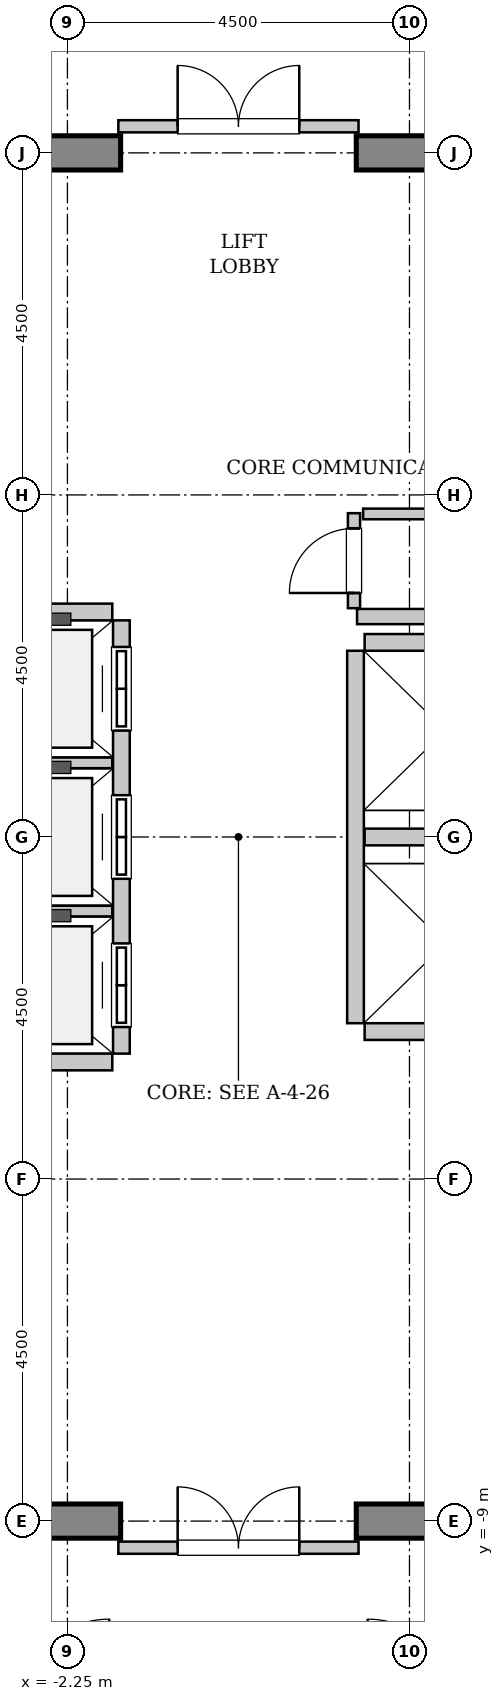
"""IFC4 building model, lengths in metres.
Left out: names, types, materials, properties, quantities, classifications, styles, units other than length and angle.
Written with IfcOpenShell. Run it as: python <this file> out.ifc"""

import sys

from ifc_helpers import new_model, si_unit, direction, frame, frame_2d, origin, place, context, subcontext, project, spatial, rectangle, extrude, source, transform, mapped, element, fill, save


model = new_model("IFC4")
c1 = context("Model", 3, precision=1e-05, world=origin(), true_north=direction((0.0, 1.0)))
c2 = subcontext(c1, "Body", "Model", "MODEL_VIEW")
j1 = project(units=[si_unit("LENGTHUNIT", "METRE"), si_unit("PLANEANGLEUNIT", "RADIAN")], contexts=[c1])
p1 = place(None, origin())
s1 = spatial("IfcSite", under=j1, at=p1, CompositionType="ELEMENT")
p2 = place(p1, origin())
s2 = spatial("IfcBuilding", under=s1, at=p2, CompositionType="ELEMENT")
p3 = place(p2, frame((0.0, 0.0, 317.8)))
s3 = spatial("IfcBuildingStorey", under=s2, at=p3, CompositionType="ELEMENT", Elevation=317.8)
m1 = source(origin(), c2, "Body", "SweptSolid", [
    extrude(rectangle(XDim=9.925, YDim=0.45, at=frame_2d((4.962, 0.0))), origin(), (0.0, 0.0, 1.0), 4.6),
])
for number, where, z_axis, x_axis in (
    (1, (-11.475, 9.0, 0.0), (0.0, 0.0, 1.0), (1.0, 0.0, 0.0)),
    (2, (1.55, 9.0, 0.0), (0.0, 0.0, 1.0), (1.0, 0.0, 0.0)),
    (3, (-11.475, -9.0, 0.0), (0.0, 0.0, 1.0), (1.0, 0.0, 0.0)),
    (4, (1.55, -9.0, 0.0), (0.0, 0.0, 1.0), (1.0, 0.0, 0.0)),
):
    element("IfcWall", number, at=place(p3, frame(where, z_axis=z_axis, x_axis=x_axis)), inside=s3, PredefinedType="SHEAR", context=c2, shape_type="MappedRepresentation", body=[
        mapped(m1, transform((0.0, 0.0, 0.0), x_axis=(1.0, 0.0, 0.0), y_axis=(0.0, 1.0, 0.0), z_axis=(0.0, 0.0, 1.0), scale=1.0)),
    ])
m2 = source(origin(), c2, "Body", "SweptSolid", [
    extrude(rectangle(XDim=5.7, YDim=0.22, at=frame_2d((2.85, 0.0))), origin(), (0.0, 0.0, 1.0), 4.335),
])
p4 = place(p3, frame((-1.54, -2.85, 0.0), z_axis=(0.0, 0.0, 1.0), x_axis=(0.0, 1.0, 0.0)))
e5 = element("IfcWall", 5, at=p4, inside=s3, PredefinedType="SOLIDWALL", context=c2, shape_type="MappedRepresentation", body=[
    mapped(m2, transform((0.0, 0.0, 0.0), x_axis=(1.0, 0.0, 0.0), y_axis=(0.0, 1.0, 0.0), z_axis=(0.0, 0.0, 1.0), scale=1.0)),
])
p5 = place(p4, frame((0.35, 0.0, 0.0)))
e6 = element("IfcOpeningElement", 6, at=p5, cuts=e5, PredefinedType="OPENING", context=c2, shape_type="SweptSolid", body=[
    extrude(rectangle(XDim=1.1, YDim=2.2, at=frame_2d((0.55, 1.1))), frame((0.0, 0.12, 0.0), z_axis=(0.0, -1.0, 0.0), x_axis=(1.0, 0.0, 0.0)), (0.0, 0.0, 1.0), 0.24),
])
p6 = place(p4, frame((2.3, 0.0, 0.0)))
e7 = element("IfcOpeningElement", 7, at=p6, cuts=e5, PredefinedType="OPENING", context=c2, shape_type="SweptSolid", body=[
    extrude(rectangle(XDim=1.1, YDim=2.2, at=frame_2d((0.55, 1.1))), frame((0.0, 0.12, 0.0), z_axis=(0.0, -1.0, 0.0), x_axis=(1.0, 0.0, 0.0)), (0.0, 0.0, 1.0), 0.24),
])
p7 = place(p4, frame((4.25, 0.0, 0.0)))
e8 = element("IfcOpeningElement", 8, at=p7, cuts=e5, PredefinedType="OPENING", context=c2, shape_type="SweptSolid", body=[
    extrude(rectangle(XDim=1.1, YDim=2.2, at=frame_2d((0.55, 1.1))), frame((0.0, 0.12, 0.0), z_axis=(0.0, -1.0, 0.0), x_axis=(1.0, 0.0, 0.0)), (0.0, 0.0, 1.0), 0.24),
])
m3 = source(origin(), c2, "Body", "SweptSolid", [
    extrude(rectangle(XDim=2.13, YDim=0.22, at=frame_2d((1.065, 0.0))), origin(), (0.0, 0.0, 1.0), 4.335),
])
p8 = place(p3, frame((-3.79, -2.96, 0.0), z_axis=(0.0, 0.0, 1.0), x_axis=(1.0, 0.0, 0.0)))
e9 = element("IfcWall", 9, at=p8, inside=s3, PredefinedType="SOLIDWALL", context=c2, shape_type="MappedRepresentation", body=[
    mapped(m3, transform((0.0, 0.0, 0.0), x_axis=(1.0, 0.0, 0.0), y_axis=(0.0, 1.0, 0.0), z_axis=(0.0, 0.0, 1.0), scale=1.0)),
])
m4 = source(origin(), c2, "Body", "SweptSolid", [
    extrude(rectangle(XDim=2.13, YDim=0.14, at=frame_2d((1.065, 0.0))), origin(), (0.0, 0.0, 1.0), 4.335),
])
for number, where, z_axis, x_axis in (
    (10, (-3.79, -0.975, 0.0), (0.0, 0.0, 1.0), (1.0, 0.0, 0.0)),
    (11, (-3.79, 0.975, 0.0), (0.0, 0.0, 1.0), (1.0, 0.0, 0.0)),
):
    element("IfcWall", number, at=place(p3, frame(where, z_axis=z_axis, x_axis=x_axis)), inside=s3, PredefinedType="PARTITIONING", context=c2, shape_type="MappedRepresentation", body=[
        mapped(m4, transform((0.0, 0.0, 0.0), x_axis=(1.0, 0.0, 0.0), y_axis=(0.0, 1.0, 0.0), z_axis=(0.0, 0.0, 1.0), scale=1.0)),
    ])
p9 = place(p3, frame((-1.66, 2.96, 0.0), z_axis=(0.0, 0.0, 1.0), x_axis=(-1.0, 0.0, 0.0)))
e12 = element("IfcWall", 12, at=p9, inside=s3, PredefinedType="SOLIDWALL", context=c2, shape_type="MappedRepresentation", body=[
    mapped(m3, transform((0.0, 0.0, 0.0), x_axis=(1.0, 0.0, 0.0), y_axis=(0.0, 1.0, 0.0), z_axis=(0.0, 0.0, 1.0), scale=1.0)),
])
m5 = source(origin(), c2, "Body", "SweptSolid", [
    extrude(rectangle(XDim=4.9, YDim=0.22, at=frame_2d((2.45, 0.0))), origin(), (0.0, 0.0, 1.0), 4.335),
])
p10 = place(p3, frame((1.54, 2.45, 0.0), z_axis=(0.0, 0.0, 1.0), x_axis=(0.0, -1.0, 0.0)))
e13 = element("IfcWall", 13, at=p10, inside=s3, PredefinedType="SOLIDWALL", context=c2, shape_type="MappedRepresentation", body=[
    mapped(m5, transform((0.0, 0.0, 0.0), x_axis=(1.0, 0.0, 0.0), y_axis=(0.0, 1.0, 0.0), z_axis=(0.0, 0.0, 1.0), scale=1.0)),
])
for number, where, z_axis, x_axis in (
    (14, (1.66, -2.56, 0.0), (0.0, 0.0, 1.0), (1.0, 0.0, 0.0)),
    (15, (1.66, 0.0, 0.0), (0.0, 0.0, 1.0), (1.0, 0.0, 0.0)),
    (16, (3.79, 2.56, 0.0), (0.0, 0.0, 1.0), (-1.0, 0.0, 0.0)),
):
    element("IfcWall", number, at=place(p3, frame(where, z_axis=z_axis, x_axis=x_axis)), inside=s3, PredefinedType="SOLIDWALL", context=c2, shape_type="MappedRepresentation", body=[
        mapped(m3, transform((0.0, 0.0, 0.0), x_axis=(1.0, 0.0, 0.0), y_axis=(0.0, 1.0, 0.0), z_axis=(0.0, 0.0, 1.0), scale=1.0)),
    ])
m6 = source(origin(), c2, "Body", "SweptSolid", [
    extrude(rectangle(XDim=2.52, YDim=0.2, at=frame_2d((1.26, 0.0))), origin(), (0.0, 0.0, 1.0), 4.335),
])
p11 = place(p3, frame((1.56, 2.9, 0.0), z_axis=(0.0, 0.0, 1.0), x_axis=(1.0, 0.0, 0.0)))
e17 = element("IfcWall", 17, at=p11, inside=s3, PredefinedType="PARTITIONING", context=c2, shape_type="MappedRepresentation", body=[
    mapped(m6, transform((0.0, 0.0, 0.0), x_axis=(1.0, 0.0, 0.0), y_axis=(0.0, 1.0, 0.0), z_axis=(0.0, 0.0, 1.0), scale=1.0)),
])
m7 = source(origin(), c2, "Body", "SweptSolid", [
    extrude(rectangle(XDim=3.16, YDim=0.16, at=frame_2d((1.58, 0.0))), origin(), (0.0, 0.0, 1.0), 3.425),
])
p12 = place(p3, frame((-1.58, 9.35, 0.0), z_axis=(0.0, 0.0, 1.0), x_axis=(1.0, 0.0, 0.0)))
e18 = element("IfcWall", 18, at=p12, inside=s3, PredefinedType="PARTITIONING", context=c2, shape_type="MappedRepresentation", body=[
    mapped(m7, transform((0.0, 0.0, 0.0), x_axis=(1.0, 0.0, 0.0), y_axis=(0.0, 1.0, 0.0), z_axis=(0.0, 0.0, 1.0), scale=1.0)),
])
p13 = place(p12, frame((0.78, 0.0, 0.0)))
e19 = element("IfcOpeningElement", 19, at=p13, cuts=e18, PredefinedType="OPENING", context=c2, shape_type="SweptSolid", body=[
    extrude(rectangle(XDim=1.6, YDim=2.3, at=frame_2d((0.8, 1.15))), frame((0.0, 0.09, 0.0), z_axis=(0.0, -1.0, 0.0), x_axis=(1.0, 0.0, 0.0)), (0.0, 0.0, 1.0), 0.18),
])
p14 = place(p3, frame((-1.58, -9.35, 0.0), z_axis=(0.0, 0.0, 1.0), x_axis=(1.0, 0.0, 0.0)))
e20 = element("IfcWall", 20, at=p14, inside=s3, PredefinedType="PARTITIONING", context=c2, shape_type="MappedRepresentation", body=[
    mapped(m7, transform((0.0, 0.0, 0.0), x_axis=(1.0, 0.0, 0.0), y_axis=(0.0, 1.0, 0.0), z_axis=(0.0, 0.0, 1.0), scale=1.0)),
])
p15 = place(p14, frame((0.78, 0.0, 0.0)))
e21 = element("IfcOpeningElement", 21, at=p15, cuts=e20, PredefinedType="OPENING", context=c2, shape_type="SweptSolid", body=[
    extrude(rectangle(XDim=1.6, YDim=2.3, at=frame_2d((0.8, 1.15))), frame((0.0, 0.09, 0.0), z_axis=(0.0, -1.0, 0.0), x_axis=(1.0, 0.0, 0.0)), (0.0, 0.0, 1.0), 0.18),
])
m8 = source(origin(), c2, "Body", "SweptSolid", [
    extrude(rectangle(XDim=1.25, YDim=0.16, at=frame_2d((0.625, 0.0))), origin(), (0.0, 0.0, 1.0), 4.335),
])
p16 = place(p3, frame((1.52, 3.01, 0.0), z_axis=(0.0, 0.0, 1.0), x_axis=(0.0, 1.0, 0.0)))
e22 = element("IfcWall", 22, at=p16, inside=s3, PredefinedType="PARTITIONING", context=c2, shape_type="MappedRepresentation", body=[
    mapped(m8, transform((0.0, 0.0, 0.0), x_axis=(1.0, 0.0, 0.0), y_axis=(0.0, 1.0, 0.0), z_axis=(0.0, 0.0, 1.0), scale=1.0)),
])
p17 = place(p16, frame((0.2, 0.0, 0.0)))
e23 = element("IfcOpeningElement", 23, at=p17, cuts=e22, PredefinedType="OPENING", context=c2, shape_type="SweptSolid", body=[
    extrude(rectangle(XDim=0.85, YDim=2.1, at=frame_2d((0.425, 1.05))), frame((0.0, 0.09, 0.0), z_axis=(0.0, -1.0, 0.0), x_axis=(1.0, 0.0, 0.0)), (0.0, 0.0, 1.0), 0.18),
])
m9 = source(origin(), c2, "Body", "SweptSolid", [
    extrude(rectangle(XDim=3.15, YDim=0.14, at=frame_2d((1.575, 0.0))), origin(), (0.0, 0.0, 1.0), 4.335),
])
p18 = place(p3, frame((1.64, 4.25, 0.0), z_axis=(0.0, 0.0, 1.0), x_axis=(1.0, 0.0, 0.0)))
e24 = element("IfcWall", 24, at=p18, inside=s3, PredefinedType="PARTITIONING", context=c2, shape_type="MappedRepresentation", body=[
    mapped(m9, transform((0.0, 0.0, 0.0), x_axis=(1.0, 0.0, 0.0), y_axis=(0.0, 1.0, 0.0), z_axis=(0.0, 0.0, 1.0), scale=1.0)),
])
m10 = source(origin(), c2, "Body", "SweptSolid", [
    extrude(rectangle(XDim=1.1, YDim=2.2, at=frame_2d((0.55, 1.1))), frame((0.0, 0.025, 0.0), z_axis=(0.0, -1.0, 0.0), x_axis=(1.0, 0.0, 0.0)), (0.0, 0.0, 1.0), 0.05),
])
p19 = place(p5, origin())
e25 = element("IfcDoor", 25, at=p19, inside=s3, OperationType="DOUBLE_DOOR_SLIDING", PredefinedType="DOOR", context=c2, shape_type="MappedRepresentation", body=[
    mapped(m10, transform((0.0, 0.0, 0.0), x_axis=(1.0, 0.0, 0.0), y_axis=(0.0, 1.0, 0.0), z_axis=(0.0, 0.0, 1.0), scale=1.0)),
])
fill(e6, e25)
p20 = place(p6, origin())
e26 = element("IfcDoor", 26, at=p20, inside=s3, OperationType="DOUBLE_DOOR_SLIDING", PredefinedType="DOOR", context=c2, shape_type="MappedRepresentation", body=[
    mapped(m10, transform((0.0, 0.0, 0.0), x_axis=(1.0, 0.0, 0.0), y_axis=(0.0, 1.0, 0.0), z_axis=(0.0, 0.0, 1.0), scale=1.0)),
])
fill(e7, e26)
p21 = place(p7, origin())
e27 = element("IfcDoor", 27, at=p21, inside=s3, OperationType="DOUBLE_DOOR_SLIDING", PredefinedType="DOOR", context=c2, shape_type="MappedRepresentation", body=[
    mapped(m10, transform((0.0, 0.0, 0.0), x_axis=(1.0, 0.0, 0.0), y_axis=(0.0, 1.0, 0.0), z_axis=(0.0, 0.0, 1.0), scale=1.0)),
])
fill(e8, e27)
m11 = source(origin(), c2, "Body", "SweptSolid", [
    extrude(rectangle(XDim=1.6, YDim=2.3, at=frame_2d((0.8, 1.15))), frame((0.0, 0.025, 0.0), z_axis=(0.0, -1.0, 0.0), x_axis=(1.0, 0.0, 0.0)), (0.0, 0.0, 1.0), 0.05),
])
p22 = place(p13, origin())
e28 = element("IfcDoor", 28, at=p22, inside=s3, OperationType="DOUBLE_DOOR_SINGLE_SWING", PredefinedType="DOOR", context=c2, shape_type="MappedRepresentation", body=[
    mapped(m11, transform((0.0, 0.0, 0.0), x_axis=(1.0, 0.0, 0.0), y_axis=(0.0, 1.0, 0.0), z_axis=(0.0, 0.0, 1.0), scale=1.0)),
])
fill(e19, e28)
p23 = place(p15, origin())
e29 = element("IfcDoor", 29, at=p23, inside=s3, OperationType="DOUBLE_DOOR_SINGLE_SWING", PredefinedType="DOOR", context=c2, shape_type="MappedRepresentation", body=[
    mapped(m11, transform((0.0, 0.0, 0.0), x_axis=(1.0, 0.0, 0.0), y_axis=(0.0, 1.0, 0.0), z_axis=(0.0, 0.0, 1.0), scale=1.0)),
])
fill(e21, e29)
m12 = source(origin(), c2, "Body", "SweptSolid", [
    extrude(rectangle(XDim=0.85, YDim=2.1, at=frame_2d((0.425, 1.05))), frame((0.0, 0.025, 0.0), z_axis=(0.0, -1.0, 0.0), x_axis=(1.0, 0.0, 0.0)), (0.0, 0.0, 1.0), 0.05),
])
p24 = place(p17, origin())
e30 = element("IfcDoor", 30, at=p24, inside=s3, OperationType="SINGLE_SWING_LEFT", PredefinedType="DOOR", context=c2, shape_type="MappedRepresentation", body=[
    mapped(m12, transform((0.0, 0.0, 0.0), x_axis=(1.0, 0.0, 0.0), y_axis=(0.0, 1.0, 0.0), z_axis=(0.0, 0.0, 1.0), scale=1.0)),
])
fill(e23, e30)
save(model, sys.argv[1])
